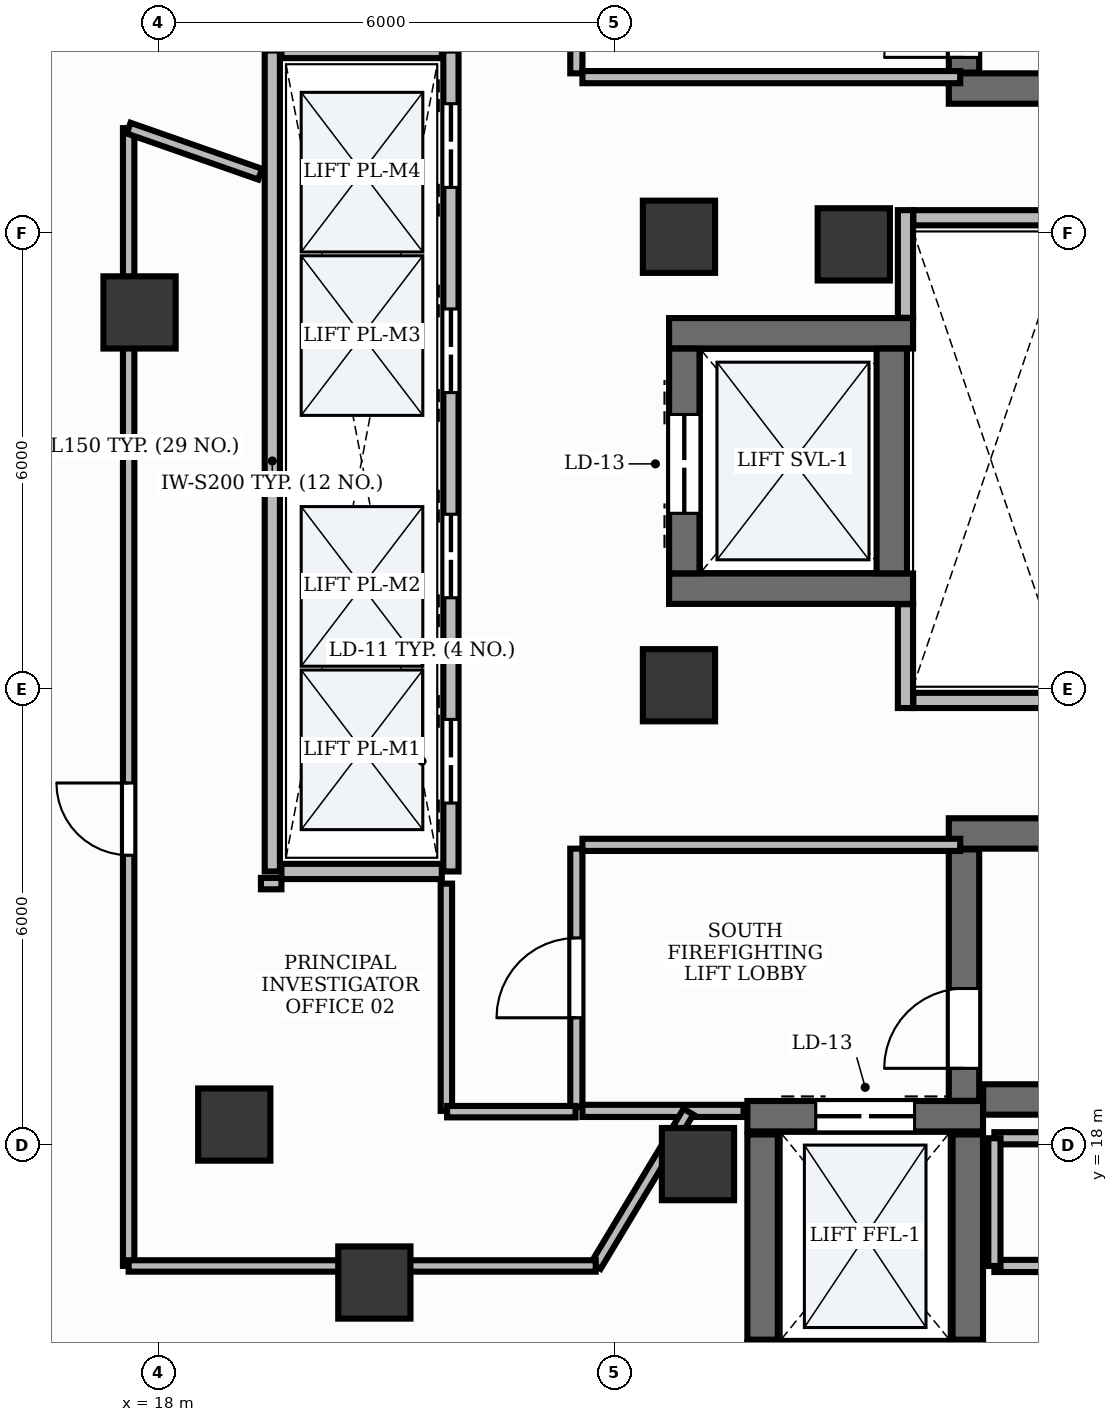
"""IFC4 building model, lengths in metres.
Left out: names, types, materials, properties, quantities, classifications, styles, units other than length and angle.
Written with IfcOpenShell. Run it as: python <this file> out.ifc"""

import sys

from ifc_helpers import new_model, si_unit, direction, frame, frame_2d, origin, origin_2d, place, context, subcontext, project, spatial, rectangle, extrude, element, fill, save


model = new_model("IFC4")
c1 = context("Model", 3, precision=1e-05, world=origin(), true_north=direction((0.0, 1.0)))
c2 = subcontext(c1, "Body", "Model", "MODEL_VIEW")
j1 = project(units=[si_unit("LENGTHUNIT", "METRE"), si_unit("PLANEANGLEUNIT", "RADIAN")], contexts=[c1])
p1 = place(None, origin())
s1 = spatial("IfcSite", under=j1, at=p1, CompositionType="ELEMENT")
p2 = place(p1, origin())
s2 = spatial("IfcBuilding", under=s1, at=p2, CompositionType="ELEMENT")
p3 = place(p2, frame((0.0, 0.0, 192.0)))
s3 = spatial("IfcBuildingStorey", under=s2, at=p3, CompositionType="ELEMENT", Elevation=192.0)
p4 = place(p3, frame((28.4, 31.9, 0.0), z_axis=(0.0, 0.0, 1.0), x_axis=(1.0, 0.0, 0.0)))
e1 = element("IfcWall", 1, at=p4, inside=s3, PredefinedType="SHEAR", context=c2, shape_type="SweptSolid", body=[
    extrude(rectangle(XDim=8.65, YDim=0.4, at=frame_2d((4.325, 0.0))), origin(), (0.0, 0.0, 1.0), 3.9),
])
p5 = place(p3, frame((28.6, 32.11, 0.0), z_axis=(0.0, 0.0, 1.0), x_axis=(0.0, 1.0, 0.0)))
e2 = element("IfcWall", 2, at=p5, inside=s3, PredefinedType="SHEAR", context=c2, shape_type="SweptSolid", body=[
    extrude(rectangle(XDim=3.308, YDim=0.4, at=frame_2d((1.654, 0.0))), origin(), (0.0, 0.0, 1.0), 3.9),
])
p6 = place(p5, frame((0.2, 0.0, 0.0)))
e3 = element("IfcOpeningElement", 3, at=p6, cuts=e2, PredefinedType="OPENING", context=c2, shape_type="SweptSolid", body=[
    extrude(rectangle(XDim=1.05, YDim=2.15, at=frame_2d((0.525, 1.075))), frame((0.0, 0.215, 0.0), z_axis=(0.0, -1.0, 0.0), x_axis=(1.0, 0.0, 0.0)), (0.0, 0.0, 1.0), 0.43),
])
p7 = place(p3, frame((28.852, 18.6, 0.0), z_axis=(0.0, 0.0, 1.0), x_axis=(1.0, 0.0, 0.0)))
e4 = element("IfcWall", 4, at=p7, inside=s3, PredefinedType="SHEAR", context=c2, shape_type="SweptSolid", body=[
    extrude(rectangle(XDim=8.198, YDim=0.4, at=frame_2d((4.099, 0.0))), origin(), (0.0, 0.0, 1.0), 3.9),
])
p8 = place(p3, frame((28.4, 22.1, 0.0), z_axis=(0.0, 0.0, 1.0), x_axis=(1.0, 0.0, 0.0)))
e5 = element("IfcWall", 5, at=p8, inside=s3, PredefinedType="SHEAR", context=c2, shape_type="SweptSolid", body=[
    extrude(rectangle(XDim=8.65, YDim=0.4, at=frame_2d((4.325, 0.0))), origin(), (0.0, 0.0, 1.0), 3.9),
])
p9 = place(p3, frame((28.6, 18.582, 0.0), z_axis=(0.0, 0.0, 1.0), x_axis=(0.0, 1.0, 0.0)))
e6 = element("IfcWall", 6, at=p9, inside=s3, PredefinedType="SHEAR", context=c2, shape_type="SweptSolid", body=[
    extrude(rectangle(XDim=3.308, YDim=0.4, at=frame_2d((1.654, 0.0))), origin(), (0.0, 0.0, 1.0), 3.9),
])
p10 = place(p9, frame((0.428, 0.0, 0.0)))
e7 = element("IfcOpeningElement", 7, at=p10, cuts=e6, PredefinedType="OPENING", context=c2, shape_type="SweptSolid", body=[
    extrude(rectangle(XDim=1.05, YDim=2.15, at=frame_2d((0.525, 1.075))), frame((0.0, 0.215, 0.0), z_axis=(0.0, -1.0, 0.0), x_axis=(1.0, 0.0, 0.0)), (0.0, 0.0, 1.0), 0.43),
])
p11 = place(p3, frame((25.75, 18.38, 0.0), z_axis=(0.0, 0.0, 1.0), x_axis=(1.0, 0.0, 0.0)))
e8 = element("IfcWall", 8, at=p11, inside=s3, PredefinedType="SHEAR", context=c2, shape_type="SweptSolid", body=[
    extrude(rectangle(XDim=3.1, YDim=0.4, at=frame_2d((1.55, 0.0))), origin(), (0.0, 0.0, 1.0), 3.9),
])
p12 = place(p11, frame((0.9, 0.0, 0.0)))
e9 = element("IfcOpeningElement", 9, at=p12, cuts=e8, PredefinedType="OPENING", context=c2, shape_type="SweptSolid", body=[
    extrude(rectangle(XDim=1.3, YDim=2.2, at=frame_2d((0.65, 1.1))), frame((0.0, 0.215, 0.0), z_axis=(0.0, -1.0, 0.0), x_axis=(1.0, 0.0, 0.0)), (0.0, 0.0, 1.0), 0.43),
])
for number, where, z_axis, x_axis in (
    (10, (25.95, 15.44, 0.0), (0.0, 0.0, 1.0), (0.0, 1.0, 0.0)),
    (11, (28.65, 15.44, 0.0), (0.0, 0.0, 1.0), (0.0, 1.0, 0.0)),
):
    element("IfcWall", number, at=place(p3, frame(where, z_axis=z_axis, x_axis=x_axis)), inside=s3, PredefinedType="SHEAR", context=c2, shape_type="SweptSolid", body=[
        extrude(rectangle(XDim=2.7, YDim=0.4, at=frame_2d((1.35, 0.0))), origin(), (0.0, 0.0, 1.0), 3.9),
    ])
for number, where, z_axis, x_axis in (
    (12, (24.72, 28.68, 0.0), (0.0, 0.0, 1.0), (1.0, 0.0, 0.0)),
    (13, (24.72, 25.32, 0.0), (0.0, 0.0, 1.0), (1.0, 0.0, 0.0)),
):
    element("IfcWall", number, at=place(p3, frame(where, z_axis=z_axis, x_axis=x_axis)), inside=s3, PredefinedType="SHEAR", context=c2, shape_type="SweptSolid", body=[
        extrude(rectangle(XDim=3.21, YDim=0.4, at=frame_2d((1.605, 0.0))), origin(), (0.0, 0.0, 1.0), 3.9),
    ])
p13 = place(p3, frame((24.92, 25.522, 0.0), z_axis=(0.0, 0.0, 1.0), x_axis=(0.0, 1.0, 0.0)))
e14 = element("IfcWall", 14, at=p13, inside=s3, PredefinedType="SHEAR", context=c2, shape_type="SweptSolid", body=[
    extrude(rectangle(XDim=2.956, YDim=0.4, at=frame_2d((1.478, 0.0))), origin(), (0.0, 0.0, 1.0), 3.9),
])
p14 = place(p13, frame((0.79, 0.0, 0.0)))
e15 = element("IfcOpeningElement", 15, at=p14, cuts=e14, PredefinedType="OPENING", context=c2, shape_type="SweptSolid", body=[
    extrude(rectangle(XDim=1.3, YDim=2.2, at=frame_2d((0.65, 1.1))), frame((0.0, 0.215, 0.0), z_axis=(0.0, -1.0, 0.0), x_axis=(1.0, 0.0, 0.0)), (0.0, 0.0, 1.0), 0.43),
])
p15 = place(p3, frame((27.65, 25.522, 0.0), z_axis=(0.0, 0.0, 1.0), x_axis=(0.0, 1.0, 0.0)))
e16 = element("IfcWall", 16, at=p15, inside=s3, PredefinedType="SHEAR", context=c2, shape_type="SweptSolid", body=[
    extrude(rectangle(XDim=2.956, YDim=0.4, at=frame_2d((1.478, 0.0))), origin(), (0.0, 0.0, 1.0), 3.9),
])
for number, where, z_axis, x_axis in (
    (17, (24.85, 29.95, -0.0), (0.0, 0.0, 1.0), (1.0, 0.0, 0.0)),
    (18, (27.15, 29.85, -0.0), (0.0, 0.0, 1.0), (1.0, 0.0, 0.0)),
    (19, (24.85, 24.05, -0.0), (0.0, 0.0, 1.0), (1.0, 0.0, 0.0)),
    (20, (25.1, 17.75, -0.0), (0.0, 0.0, 1.0), (1.0, 0.0, 0.0)),
):
    element("IfcColumn", number, at=place(p3, frame(where, z_axis=z_axis, x_axis=x_axis)), inside=s3, PredefinedType="PILASTER", context=c2, shape_type="SweptSolid", body=[
        extrude(rectangle(XDim=0.95, YDim=0.95, at=origin_2d()), origin(), (0.0, 0.0, 1.0), 3.901),
    ])
for number, where, z_axis, x_axis in (
    (21, (17.753, 28.955, -0.0), (0.0, 0.0, 1.0), (1.0, 0.0, 0.0)),
    (22, (19.0, 18.27, -0.0), (0.0, 0.0, 1.0), (1.0, 0.0, 0.0)),
    (23, (20.842, 16.192, -0.0), (0.0, 0.0, 1.0), (1.0, 0.0, 0.0)),
):
    element("IfcColumn", number, at=place(p3, frame(where, z_axis=z_axis, x_axis=x_axis)), inside=s3, PredefinedType="COLUMN", context=c2, shape_type="SweptSolid", body=[
        extrude(rectangle(XDim=0.95, YDim=0.95, at=origin_2d()), origin(), (0.0, 0.0, 1.0), 3.901),
    ])
p16 = place(p3, frame((19.5, 21.6, 0.0), z_axis=(0.0, 0.0, 1.0), x_axis=(0.0, 1.0, 0.0)))
e24 = element("IfcWall", 24, at=p16, inside=s3, PredefinedType="PARTITIONING", context=c2, shape_type="SweptSolid", body=[
    extrude(rectangle(XDim=10.8, YDim=0.2, at=frame_2d((5.4, 0.0))), origin(), (0.0, 0.0, 1.0), 2.91),
])
p17 = place(p3, frame((21.85, 21.6, 0.0), z_axis=(0.0, 0.0, 1.0), x_axis=(0.0, 1.0, 0.0)))
e25 = element("IfcWall", 25, at=p17, inside=s3, PredefinedType="PARTITIONING", context=c2, shape_type="SweptSolid", body=[
    extrude(rectangle(XDim=10.8, YDim=0.2, at=frame_2d((5.4, 0.0))), origin(), (0.0, 0.0, 1.0), 2.91),
])
p18 = place(p17, frame((0.9, 0.0, 0.0)))
e26 = element("IfcOpeningElement", 26, at=p18, cuts=e25, PredefinedType="OPENING", context=c2, shape_type="SweptSolid", body=[
    extrude(rectangle(XDim=1.1, YDim=2.2, at=frame_2d((0.55, 1.1))), frame((0.0, 0.115, 0.0), z_axis=(0.0, -1.0, 0.0), x_axis=(1.0, 0.0, 0.0)), (0.0, 0.0, 1.0), 0.23),
])
p19 = place(p17, frame((3.6, 0.0, 0.0)))
e27 = element("IfcOpeningElement", 27, at=p19, cuts=e25, PredefinedType="OPENING", context=c2, shape_type="SweptSolid", body=[
    extrude(rectangle(XDim=1.1, YDim=2.2, at=frame_2d((0.55, 1.1))), frame((0.0, 0.115, 0.0), z_axis=(0.0, -1.0, 0.0), x_axis=(1.0, 0.0, 0.0)), (0.0, 0.0, 1.0), 0.23),
])
p20 = place(p17, frame((6.3, 0.0, 0.0)))
e28 = element("IfcOpeningElement", 28, at=p20, cuts=e25, PredefinedType="OPENING", context=c2, shape_type="SweptSolid", body=[
    extrude(rectangle(XDim=1.1, YDim=2.2, at=frame_2d((0.55, 1.1))), frame((0.0, 0.115, 0.0), z_axis=(0.0, -1.0, 0.0), x_axis=(1.0, 0.0, 0.0)), (0.0, 0.0, 1.0), 0.23),
])
p21 = place(p17, frame((9.0, 0.0, 0.0)))
e29 = element("IfcOpeningElement", 29, at=p21, cuts=e25, PredefinedType="OPENING", context=c2, shape_type="SweptSolid", body=[
    extrude(rectangle(XDim=1.1, YDim=2.2, at=frame_2d((0.55, 1.1))), frame((0.0, 0.115, 0.0), z_axis=(0.0, -1.0, 0.0), x_axis=(1.0, 0.0, 0.0)), (0.0, 0.0, 1.0), 0.23),
])
for number, where, z_axis, x_axis in (
    (30, (19.62, 21.6, 0.0), (0.0, 0.0, 1.0), (1.0, 0.0, 0.0)),
    (31, (19.62, 32.4, 0.0), (0.0, 0.0, 1.0), (1.0, 0.0, 0.0)),
):
    element("IfcWall", number, at=place(p3, frame(where, z_axis=z_axis, x_axis=x_axis)), inside=s3, PredefinedType="PARTITIONING", context=c2, shape_type="SweptSolid", body=[
        extrude(rectangle(XDim=2.11, YDim=0.2, at=frame_2d((1.055, 0.0))), origin(), (0.0, 0.0, 1.0), 2.91),
    ])
p22 = place(p3, frame((27.83, 23.75, 0.0), z_axis=(0.0, 0.0, 1.0), x_axis=(0.0, 1.0, 0.0)))
e32 = element("IfcWall", 32, at=p22, inside=s3, PredefinedType="PARTITIONING", context=c2, shape_type="SweptSolid", body=[
    extrude(rectangle(XDim=1.366, YDim=0.2, at=frame_2d((0.683, 0.0))), origin(), (0.0, 0.0, 1.0), 2.91),
])
p23 = place(p3, frame((27.83, 28.884, 0.0), z_axis=(0.0, 0.0, 1.0), x_axis=(0.0, 1.0, 0.0)))
e33 = element("IfcWall", 33, at=p23, inside=s3, PredefinedType="PARTITIONING", context=c2, shape_type="SweptSolid", body=[
    extrude(rectangle(XDim=1.416, YDim=0.2, at=frame_2d((0.708, 0.0))), origin(), (0.0, 0.0, 1.0), 2.91),
])
for number, where, z_axis, x_axis in (
    (34, (27.934, 23.85, 0.0), (0.0, 0.0, 1.0), (1.0, 0.0, 0.0)),
    (35, (27.934, 30.2, 0.0), (0.0, 0.0, 1.0), (1.0, 0.0, 0.0)),
):
    element("IfcWall", number, at=place(p3, frame(where, z_axis=z_axis, x_axis=x_axis)), inside=s3, PredefinedType="PARTITIONING", context=c2, shape_type="SweptSolid", body=[
        extrude(rectangle(XDim=2.096, YDim=0.2, at=frame_2d((1.048, 0.0))), origin(), (0.0, 0.0, 1.0), 2.91),
    ])
p24 = place(p3, frame((23.5, 32.1, 0.0), z_axis=(0.0, 0.0, 1.0), x_axis=(0.0, 1.0, 0.0)))
e36 = element("IfcWall", 36, at=p24, inside=s3, PredefinedType="PARTITIONING", context=c2, shape_type="SweptSolid", body=[
    extrude(rectangle(XDim=3.4, YDim=0.16, at=frame_2d((1.7, 0.0))), origin(), (0.0, 0.0, 1.0), 2.91),
])
p25 = place(p24, frame((1.175, 0.0, 0.0)))
e37 = element("IfcOpeningElement", 37, at=p25, cuts=e36, PredefinedType="OPENING", context=c2, shape_type="SweptSolid", body=[
    extrude(rectangle(XDim=1.05, YDim=2.15, at=frame_2d((0.525, 1.075))), frame((0.0, 0.095, 0.0), z_axis=(0.0, -1.0, 0.0), x_axis=(1.0, 0.0, 0.0)), (0.0, 0.0, 1.0), 0.19),
])
p26 = place(p3, frame((23.5, 18.5, 0.0), z_axis=(0.0, 0.0, 1.0), x_axis=(0.0, 1.0, 0.0)))
e38 = element("IfcWall", 38, at=p26, inside=s3, PredefinedType="PARTITIONING", context=c2, shape_type="SweptSolid", body=[
    extrude(rectangle(XDim=3.4, YDim=0.16, at=frame_2d((1.7, 0.0))), origin(), (0.0, 0.0, 1.0), 2.91),
])
p27 = place(p26, frame((1.175, 0.0, 0.0)))
e39 = element("IfcOpeningElement", 39, at=p27, cuts=e38, PredefinedType="OPENING", context=c2, shape_type="SweptSolid", body=[
    extrude(rectangle(XDim=1.05, YDim=2.15, at=frame_2d((0.525, 1.075))), frame((0.0, 0.095, 0.0), z_axis=(0.0, -1.0, 0.0), x_axis=(1.0, 0.0, 0.0)), (0.0, 0.0, 1.0), 0.19),
])
for number, where, z_axis, x_axis in (
    (40, (23.58, 32.05, 0.0), (0.0, 0.0, 1.0), (1.0, 0.0, 0.0)),
    (41, (23.58, 21.95, 0.0), (0.0, 0.0, 1.0), (1.0, 0.0, 0.0)),
):
    element("IfcWall", number, at=place(p3, frame(where, z_axis=z_axis, x_axis=x_axis)), inside=s3, PredefinedType="PARTITIONING", context=c2, shape_type="SweptSolid", body=[
        extrude(rectangle(XDim=4.97, YDim=0.16, at=frame_2d((2.485, 0.0))), origin(), (0.0, 0.0, 1.0), 2.91),
    ])
p28 = place(p3, frame((23.58, 18.45, 0.0), z_axis=(0.0, 0.0, 1.0), x_axis=(1.0, 0.0, 0.0)))
e42 = element("IfcWall", 42, at=p28, inside=s3, PredefinedType="PARTITIONING", context=c2, shape_type="SweptSolid", body=[
    extrude(rectangle(XDim=2.12, YDim=0.16, at=frame_2d((1.06, 0.0))), origin(), (0.0, 0.0, 1.0), 2.91),
])
p29 = place(p3, frame((17.61, 16.41, 0.0), z_axis=(0.0, 0.0, 1.0), x_axis=(0.0, 1.0, 0.0)))
e43 = element("IfcWall", 43, at=p29, inside=s3, PredefinedType="PARTITIONING", context=c2, shape_type="SweptSolid", body=[
    extrude(rectangle(XDim=14.969, YDim=0.15, at=frame_2d((7.484, 0.0))), origin(), (0.0, 0.0, 1.0), 2.91),
])
p30 = place(p29, frame((5.404, 0.0, 0.0)))
e44 = element("IfcOpeningElement", 44, at=p30, cuts=e43, PredefinedType="OPENING", context=c2, shape_type="SweptSolid", body=[
    extrude(rectangle(XDim=0.95, YDim=2.15, at=frame_2d((0.475, 1.075))), frame((0.0, 0.09, 0.0), z_axis=(0.0, -1.0, 0.0), x_axis=(1.0, 0.0, 0.0)), (0.0, 0.0, 1.0), 0.18),
])
p31 = place(p3, frame((40.342, 16.41, 0.0), z_axis=(0.0, 0.0, 1.0), x_axis=(-1.0, 0.0, 0.0)))
e45 = element("IfcWall", 45, at=p31, inside=s3, PredefinedType="PARTITIONING", context=c2, shape_type="SweptSolid", body=[
    extrude(rectangle(XDim=11.342, YDim=0.16, at=frame_2d((5.671, 0.0))), origin(), (0.0, 0.0, 1.0), 2.91),
])
p32 = place(p31, frame((6.14, 0.0, 0.0)))
e46 = element("IfcOpeningElement", 46, at=p32, cuts=e45, PredefinedType="OPENING", context=c2, shape_type="SweptSolid", body=[
    extrude(rectangle(XDim=0.95, YDim=2.15, at=frame_2d((0.475, 1.075))), frame((0.0, 0.095, 0.0), z_axis=(0.0, -1.0, 0.0), x_axis=(1.0, 0.0, 0.0)), (0.0, 0.0, 1.0), 0.19),
])
p33 = place(p3, frame((19.35, 21.44, 0.0), z_axis=(0.0, 0.0, 1.0), x_axis=(1.0, 0.0, 0.0)))
e47 = element("IfcWall", 47, at=p33, inside=s3, PredefinedType="PARTITIONING", context=c2, shape_type="SweptSolid", body=[
    extrude(rectangle(XDim=0.27, YDim=0.15, at=frame_2d((0.135, 0.0))), origin(), (0.0, 0.0, 1.0), 2.91),
])
p34 = place(p3, frame((21.79, 21.44, 0.0), z_axis=(0.0, 0.0, 1.0), x_axis=(0.0, -1.0, 0.0)))
e48 = element("IfcWall", 48, at=p34, inside=s3, PredefinedType="PARTITIONING", context=c2, shape_type="SweptSolid", body=[
    extrude(rectangle(XDim=2.99, YDim=0.15, at=frame_2d((1.495, 0.0))), origin(), (0.0, 0.0, 1.0), 2.91),
])
p35 = place(p3, frame((21.8, 18.44, 0.0), z_axis=(0.0, 0.0, 1.0), x_axis=(1.0, 0.0, 0.0)))
e49 = element("IfcWall", 49, at=p35, inside=s3, PredefinedType="PARTITIONING", context=c2, shape_type="SweptSolid", body=[
    extrude(rectangle(XDim=1.69, YDim=0.15, at=frame_2d((0.845, 0.0))), origin(), (0.0, 0.0, 1.0), 2.91),
])
p36 = place(p3, frame((24.975, 18.44, 0.0), z_axis=(0.0, 0.0, 1.0), x_axis=(-0.515026255496, -0.857174402412, 0.0)))
e50 = element("IfcWall", 50, at=p36, inside=s3, PredefinedType="PARTITIONING", context=c2, shape_type="SweptSolid", body=[
    extrude(rectangle(XDim=2.368, YDim=0.15, at=frame_2d((1.184, 0.0))), origin(), (0.0, 0.0, 1.0), 2.91),
])
p37 = place(p3, frame((23.755, 16.41, 0.0), z_axis=(0.0, 0.0, 1.0), x_axis=(-1.0, 0.0, 0.0)))
e51 = element("IfcWall", 51, at=p37, inside=s3, PredefinedType="PARTITIONING", context=c2, shape_type="SweptSolid", body=[
    extrude(rectangle(XDim=6.145, YDim=0.15, at=frame_2d((3.072, 0.0))), origin(), (0.0, 0.0, 1.0), 2.91),
])
p38 = place(p3, frame((17.61, 31.379, 0.0), z_axis=(0.0, 0.0, 1.0), x_axis=(0.943806424697, -0.330498763539, 0.0)))
e52 = element("IfcWall", 52, at=p38, inside=s3, PredefinedType="PARTITIONING", context=c2, shape_type="SweptSolid", body=[
    extrude(rectangle(XDim=1.833, YDim=0.15, at=frame_2d((0.917, 0.0))), origin(), (0.0, 0.0, 1.0), 2.91),
])
p39 = place(p3, frame((29.0, 18.09, 0.0), z_axis=(0.0, 0.0, 1.0), x_axis=(1.0, 0.0, 0.0)))
e53 = element("IfcWall", 53, at=p39, inside=s3, PredefinedType="PARTITIONING", context=c2, shape_type="SweptSolid", body=[
    extrude(rectangle(XDim=8.35, YDim=0.16, at=frame_2d((4.175, 0.0))), origin(), (0.0, 0.0, 1.0), 2.91),
])
p40 = place(p3, frame((29.0, 16.41, 0.0), z_axis=(0.0, 0.0, 1.0), x_axis=(0.0, 1.0, 0.0)))
e54 = element("IfcWall", 54, at=p40, inside=s3, PredefinedType="PARTITIONING", context=c2, shape_type="SweptSolid", body=[
    extrude(rectangle(XDim=1.68, YDim=0.16, at=frame_2d((0.84, 0.0))), origin(), (0.0, 0.0, 1.0), 2.91),
])
p41 = place(p6, origin())
e55 = element("IfcDoor", 55, at=p41, inside=s3, OperationType="SINGLE_SWING_LEFT", PredefinedType="DOOR", context=c2, shape_type="SweptSolid", body=[
    extrude(rectangle(XDim=1.05, YDim=2.15, at=frame_2d((0.525, 1.075))), frame((0.0, 0.025, 0.0), z_axis=(0.0, -1.0, 0.0), x_axis=(1.0, 0.0, 0.0)), (0.0, 0.0, 1.0), 0.05),
])
fill(e3, e55)
p42 = place(p10, origin())
e56 = element("IfcDoor", 56, at=p42, inside=s3, OperationType="SINGLE_SWING_LEFT", PredefinedType="DOOR", context=c2, shape_type="SweptSolid", body=[
    extrude(rectangle(XDim=1.05, YDim=2.15, at=frame_2d((0.525, 1.075))), frame((0.0, 0.025, 0.0), z_axis=(0.0, -1.0, 0.0), x_axis=(1.0, 0.0, 0.0)), (0.0, 0.0, 1.0), 0.05),
])
fill(e7, e56)
p43 = place(p18, origin())
e57 = element("IfcDoor", 57, at=p43, inside=s3, OperationType="DOUBLE_DOOR_SLIDING", PredefinedType="DOOR", context=c2, shape_type="SweptSolid", body=[
    extrude(rectangle(XDim=1.1, YDim=2.2, at=frame_2d((0.55, 1.1))), frame((0.0, 0.025, 0.0), z_axis=(0.0, -1.0, 0.0), x_axis=(1.0, 0.0, 0.0)), (0.0, 0.0, 1.0), 0.05),
])
fill(e26, e57)
p44 = place(p19, origin())
e58 = element("IfcDoor", 58, at=p44, inside=s3, OperationType="DOUBLE_DOOR_SLIDING", PredefinedType="DOOR", context=c2, shape_type="SweptSolid", body=[
    extrude(rectangle(XDim=1.1, YDim=2.2, at=frame_2d((0.55, 1.1))), frame((0.0, 0.025, 0.0), z_axis=(0.0, -1.0, 0.0), x_axis=(1.0, 0.0, 0.0)), (0.0, 0.0, 1.0), 0.05),
])
fill(e27, e58)
p45 = place(p20, origin())
e59 = element("IfcDoor", 59, at=p45, inside=s3, OperationType="DOUBLE_DOOR_SLIDING", PredefinedType="DOOR", context=c2, shape_type="SweptSolid", body=[
    extrude(rectangle(XDim=1.1, YDim=2.2, at=frame_2d((0.55, 1.1))), frame((0.0, 0.025, 0.0), z_axis=(0.0, -1.0, 0.0), x_axis=(1.0, 0.0, 0.0)), (0.0, 0.0, 1.0), 0.05),
])
fill(e28, e59)
p46 = place(p21, origin())
e60 = element("IfcDoor", 60, at=p46, inside=s3, OperationType="DOUBLE_DOOR_SLIDING", PredefinedType="DOOR", context=c2, shape_type="SweptSolid", body=[
    extrude(rectangle(XDim=1.1, YDim=2.2, at=frame_2d((0.55, 1.1))), frame((0.0, 0.025, 0.0), z_axis=(0.0, -1.0, 0.0), x_axis=(1.0, 0.0, 0.0)), (0.0, 0.0, 1.0), 0.05),
])
fill(e29, e60)
p47 = place(p12, origin())
e61 = element("IfcDoor", 61, at=p47, inside=s3, OperationType="DOUBLE_DOOR_SLIDING", PredefinedType="DOOR", context=c2, shape_type="SweptSolid", body=[
    extrude(rectangle(XDim=1.3, YDim=2.2, at=frame_2d((0.65, 1.1))), frame((0.0, 0.025, 0.0), z_axis=(0.0, -1.0, 0.0), x_axis=(1.0, 0.0, 0.0)), (0.0, 0.0, 1.0), 0.05),
])
fill(e9, e61)
p48 = place(p14, origin())
e62 = element("IfcDoor", 62, at=p48, inside=s3, OperationType="DOUBLE_DOOR_SLIDING", PredefinedType="DOOR", context=c2, shape_type="SweptSolid", body=[
    extrude(rectangle(XDim=1.3, YDim=2.2, at=frame_2d((0.65, 1.1))), frame((0.0, 0.025, 0.0), z_axis=(0.0, -1.0, 0.0), x_axis=(1.0, 0.0, 0.0)), (0.0, 0.0, 1.0), 0.05),
])
fill(e15, e62)
p49 = place(p27, origin())
e63 = element("IfcDoor", 63, at=p49, inside=s3, OperationType="SINGLE_SWING_LEFT", PredefinedType="DOOR", context=c2, shape_type="SweptSolid", body=[
    extrude(rectangle(XDim=1.05, YDim=2.15, at=frame_2d((0.525, 1.075))), frame((0.0, 0.025, 0.0), z_axis=(0.0, -1.0, 0.0), x_axis=(1.0, 0.0, 0.0)), (0.0, 0.0, 1.0), 0.05),
])
fill(e39, e63)
p50 = place(p30, origin())
e64 = element("IfcDoor", 64, at=p50, inside=s3, OperationType="SINGLE_SWING_RIGHT", PredefinedType="DOOR", context=c2, shape_type="SweptSolid", body=[
    extrude(rectangle(XDim=0.95, YDim=2.15, at=frame_2d((0.475, 1.075))), frame((0.0, 0.025, 0.0), z_axis=(0.0, -1.0, 0.0), x_axis=(1.0, 0.0, 0.0)), (0.0, 0.0, 1.0), 0.05),
])
fill(e44, e64)
save(model, sys.argv[1])
